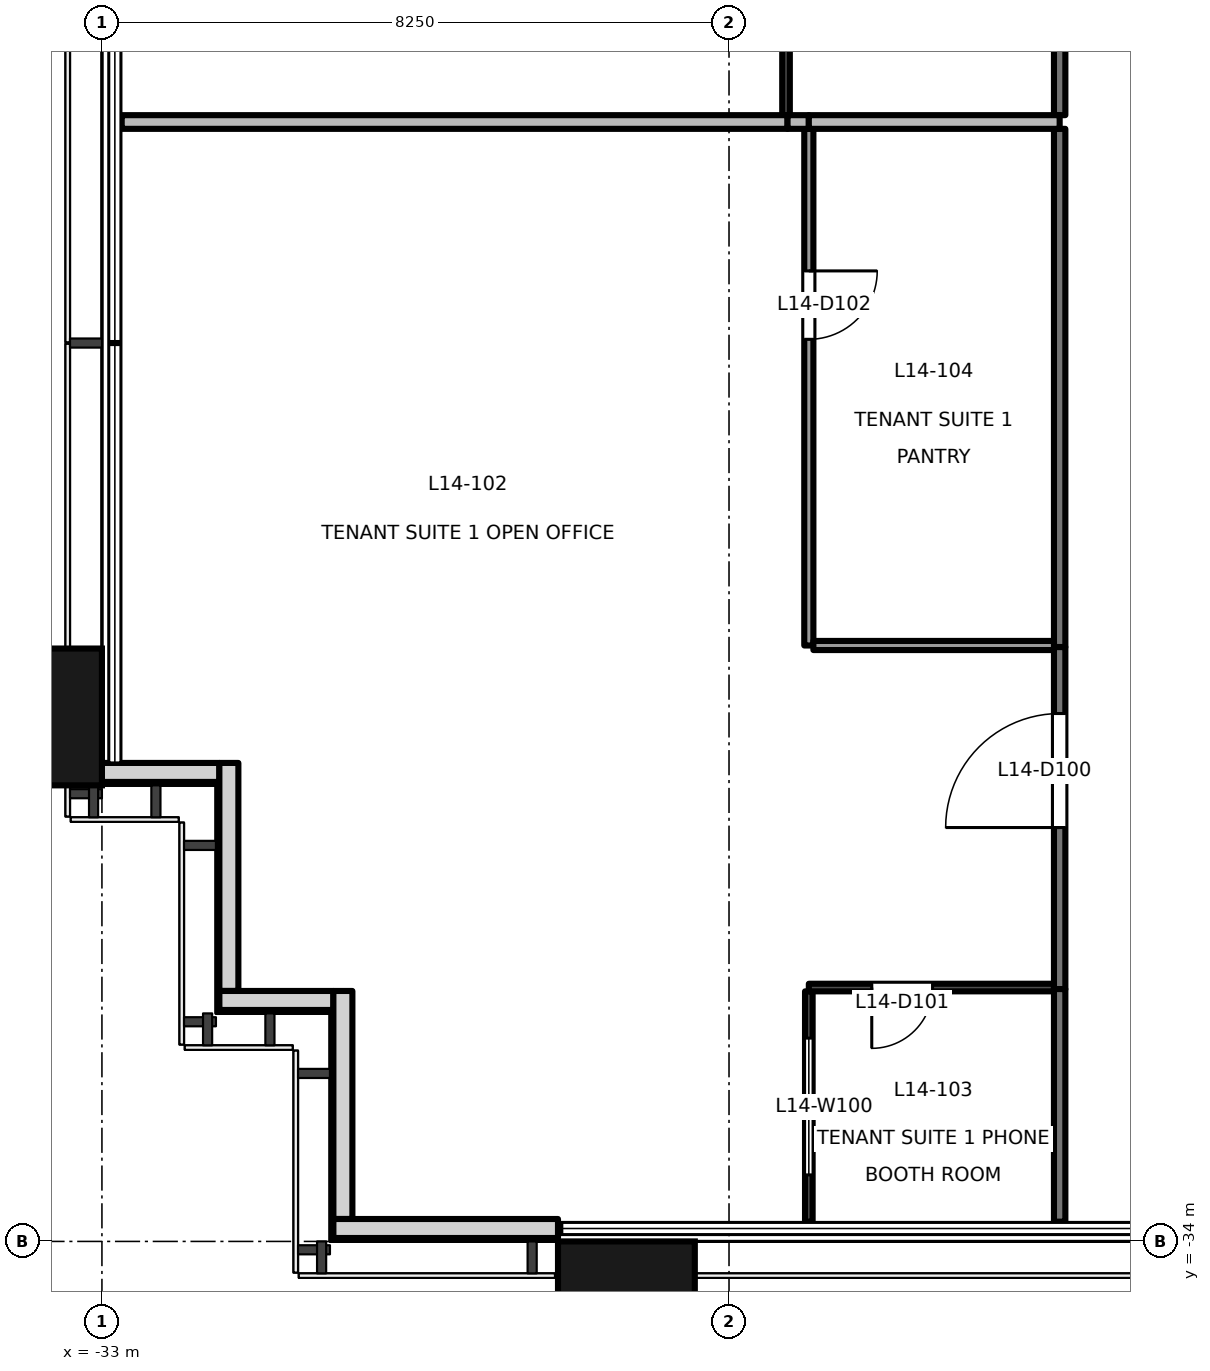
"""IFC4 building model, lengths in metres.
Left out: names, types, materials, properties, quantities, classifications, styles, units other than length and angle.
Written with IfcOpenShell. Run it as: python <this file> out.ifc"""

import sys

from ifc_helpers import new_model, si_unit, direction, frame, frame_2d, origin, origin_2d, place, context, subcontext, project, spatial, rectangle, extrude, element, fill, save


model = new_model("IFC4")
c1 = context("Model", 3, precision=1e-05, world=origin(), true_north=direction((0.0, 1.0)))
c2 = subcontext(c1, "Body", "Model", "MODEL_VIEW")
j1 = project(units=[si_unit("LENGTHUNIT", "METRE"), si_unit("PLANEANGLEUNIT", "RADIAN")], contexts=[c1])
p1 = place(None, origin())
s1 = spatial("IfcSite", under=j1, at=p1, CompositionType="ELEMENT")
p2 = place(p1, origin())
s2 = spatial("IfcBuilding", under=s1, at=p2, CompositionType="ELEMENT")
p3 = place(p2, frame((0.0, 0.0, 65.2)))
s3 = spatial("IfcBuildingStorey", under=s2, at=p3, CompositionType="ELEMENT", Elevation=65.2)
for number, where, z_axis, x_axis in (
    (1, (-26.1, -34.9, -0.2), (0.0, 0.0, 1.0), (1.0, 0.0, 0.0)),
    (2, (-33.9, -27.1, -0.2), (0.0, 0.0, 1.0), (0.0, 1.0, 0.0)),
):
    element("IfcColumn", number, at=place(p3, frame(where, z_axis=z_axis, x_axis=x_axis)), inside=s3, PredefinedType="COLUMN", context=c2, shape_type="SweptSolid", body=[
        extrude(rectangle(XDim=1.8, YDim=1.8, at=origin_2d()), origin(), (0.0, 0.0, 1.0), 4.1),
    ])
p4 = place(p3, frame((-33.005, -27.83, 0.0), z_axis=(0.0, 0.0, 1.0), x_axis=(1.0, 0.0, 0.0)))
e3 = element("IfcWall", 3, at=p4, inside=s3, PredefinedType="SOLIDWALL", context=c2, shape_type="SweptSolid", body=[
    extrude(rectangle(XDim=1.55, YDim=0.25, at=frame_2d((0.775, 0.0))), origin(), (0.0, 0.0, 1.0), 3.9),
])
p5 = place(p3, frame((-31.33, -27.705, 0.0), z_axis=(0.0, 0.0, 1.0), x_axis=(0.0, -1.0, 0.0)))
e4 = element("IfcWall", 4, at=p5, inside=s3, PredefinedType="SOLIDWALL", context=c2, shape_type="SweptSolid", body=[
    extrude(rectangle(XDim=3.0, YDim=0.25, at=frame_2d((1.5, 0.0))), origin(), (0.0, 0.0, 1.0), 3.9),
])
p6 = place(p3, frame((-31.455, -30.83, 0.0), z_axis=(0.0, 0.0, 1.0), x_axis=(1.0, 0.0, 0.0)))
e5 = element("IfcWall", 5, at=p6, inside=s3, PredefinedType="SOLIDWALL", context=c2, shape_type="SweptSolid", body=[
    extrude(rectangle(XDim=1.5, YDim=0.25, at=frame_2d((0.75, 0.0))), origin(), (0.0, 0.0, 1.0), 3.9),
])
p7 = place(p3, frame((-29.83, -30.705, 0.0), z_axis=(0.0, 0.0, 1.0), x_axis=(0.0, -1.0, 0.0)))
e6 = element("IfcWall", 6, at=p7, inside=s3, PredefinedType="SOLIDWALL", context=c2, shape_type="SweptSolid", body=[
    extrude(rectangle(XDim=3.0, YDim=0.25, at=frame_2d((1.5, 0.0))), origin(), (0.0, 0.0, 1.0), 3.9),
])
p8 = place(p3, frame((-29.955, -33.83, 0.0), z_axis=(0.0, 0.0, 1.0), x_axis=(1.0, 0.0, 0.0)))
e7 = element("IfcWall", 7, at=p8, inside=s3, PredefinedType="SOLIDWALL", context=c2, shape_type="SweptSolid", body=[
    extrude(rectangle(XDim=2.955, YDim=0.25, at=frame_2d((1.478, 0.0))), origin(), (0.0, 0.0, 1.0), 3.9),
])
p9 = place(p3, frame((-20.4, -30.68, 0.0), z_axis=(0.0, 0.0, 1.0), x_axis=(0.0, 1.0, 0.0)))
e8 = element("IfcWall", 8, at=p9, inside=s3, PredefinedType="PARTITIONING", context=c2, shape_type="SweptSolid", body=[
    extrude(rectangle(XDim=4.5, YDim=0.15, at=frame_2d((2.25, 0.0))), origin(), (0.0, 0.0, 1.0), 3.3),
])
p10 = place(p9, frame((2.125, 0.0, 0.0)))
e9 = element("IfcOpeningElement", 9, at=p10, cuts=e8, PredefinedType="OPENING", context=c2, shape_type="SweptSolid", body=[
    extrude(rectangle(XDim=1.5, YDim=2.1, at=frame_2d((0.75, 1.05))), frame((0.0, 0.085, 0.0), z_axis=(0.0, -1.0, 0.0), x_axis=(1.0, 0.0, 0.0)), (0.0, 0.0, 1.0), 0.171),
])
p11 = place(p3, frame((-20.4, -33.74, 0.0), z_axis=(0.0, 0.0, 1.0), x_axis=(0.0, 1.0, 0.0)))
e10 = element("IfcWall", 10, at=p11, inside=s3, PredefinedType="PARTITIONING", context=c2, shape_type="SweptSolid", body=[
    extrude(rectangle(XDim=3.06, YDim=0.15, at=frame_2d((1.53, 0.0))), origin(), (0.0, 0.0, 1.0), 3.9),
])
p12 = place(p3, frame((-20.4, -26.18, 0.0), z_axis=(0.0, 0.0, 1.0), x_axis=(0.0, 1.0, 0.0)))
e11 = element("IfcWall", 11, at=p12, inside=s3, PredefinedType="PARTITIONING", context=c2, shape_type="SweptSolid", body=[
    extrude(rectangle(XDim=6.817, YDim=0.15, at=frame_2d((3.408, 0.0))), origin(), (0.0, 0.0, 1.0), 3.3),
])
p13 = place(p3, frame((-20.4, -19.183, 0.0), z_axis=(0.0, 0.0, 1.0), x_axis=(0.0, 1.0, 0.0)))
e12 = element("IfcWall", 12, at=p13, inside=s3, PredefinedType="PARTITIONING", context=c2, shape_type="SweptSolid", body=[
    extrude(rectangle(XDim=5.93, YDim=0.15, at=frame_2d((2.965, 0.0))), origin(), (0.0, 0.0, 1.0), 3.3),
])
p14 = place(p3, frame((-23.7, -30.71, 0.0), z_axis=(0.0, 0.0, 1.0), x_axis=(0.0, -1.0, 0.0)))
e13 = element("IfcWall", 13, at=p14, inside=s3, PredefinedType="PARTITIONING", context=c2, shape_type="SweptSolid", body=[
    extrude(rectangle(XDim=3.03, YDim=0.1, at=frame_2d((1.515, 0.0))), origin(), (0.0, 0.0, 1.0), 3.9),
])
p15 = place(p14, frame((0.615, 0.0, 0.9)))
e14 = element("IfcOpeningElement", 14, at=p15, cuts=e13, PredefinedType="OPENING", context=c2, shape_type="SweptSolid", body=[
    extrude(rectangle(XDim=1.8, YDim=1.2, at=frame_2d((0.9, 0.6))), frame((0.0, 0.061, 0.0), z_axis=(0.0, -1.0, 0.0), x_axis=(1.0, 0.0, 0.0)), (0.0, 0.0, 1.0), 0.121),
])
p16 = place(p3, frame((-20.475, -30.66, 0.0), z_axis=(0.0, 0.0, 1.0), x_axis=(-1.0, 0.0, 0.0)))
e15 = element("IfcWall", 15, at=p16, inside=s3, PredefinedType="PARTITIONING", context=c2, shape_type="SweptSolid", body=[
    extrude(rectangle(XDim=3.225, YDim=0.1, at=frame_2d((1.612, 0.0))), origin(), (0.0, 0.0, 1.0), 3.9),
])
p17 = place(p16, frame((1.597, 0.0, 0.0)))
e16 = element("IfcOpeningElement", 16, at=p17, cuts=e15, PredefinedType="OPENING", context=c2, shape_type="SweptSolid", body=[
    extrude(rectangle(XDim=0.8, YDim=2.1, at=frame_2d((0.4, 1.05))), frame((0.0, 0.061, 0.0), z_axis=(0.0, -1.0, 0.0), x_axis=(1.0, 0.0, 0.0)), (0.0, 0.0, 1.0), 0.121),
])
p18 = place(p3, frame((-23.7, -19.363, 0.0), z_axis=(0.0, 0.0, 1.0), x_axis=(0.0, -1.0, 0.0)))
e17 = element("IfcWall", 17, at=p18, inside=s3, PredefinedType="PARTITIONING", context=c2, shape_type="SweptSolid", body=[
    extrude(rectangle(XDim=6.797, YDim=0.12, at=frame_2d((3.398, 0.0))), origin(), (0.0, 0.0, 1.0), 3.3),
])
p19 = place(p18, frame((1.869, 0.0, 0.0)))
e18 = element("IfcOpeningElement", 18, at=p19, cuts=e17, PredefinedType="OPENING", context=c2, shape_type="SweptSolid", body=[
    extrude(rectangle(XDim=0.9, YDim=2.1, at=frame_2d((0.45, 1.05))), frame((0.0, 0.071, 0.0), z_axis=(0.0, -1.0, 0.0), x_axis=(1.0, 0.0, 0.0)), (0.0, 0.0, 1.0), 0.141),
])
p20 = place(p3, frame((-23.64, -26.16, 0.0), z_axis=(0.0, 0.0, 1.0), x_axis=(1.0, 0.0, 0.0)))
e19 = element("IfcWall", 19, at=p20, inside=s3, PredefinedType="PARTITIONING", context=c2, shape_type="SweptSolid", body=[
    extrude(rectangle(XDim=3.165, YDim=0.12, at=frame_2d((1.583, 0.0))), origin(), (0.0, 0.0, 1.0), 3.9),
])
p21 = place(p3, frame((-32.74, -19.273, 0.0), z_axis=(0.0, 0.0, 1.0), x_axis=(1.0, 0.0, 0.0)))
e20 = element("IfcWall", 20, at=p21, inside=s3, PredefinedType="PARTITIONING", context=c2, shape_type="SweptSolid", body=[
    extrude(rectangle(XDim=8.76, YDim=0.18, at=frame_2d((4.38, 0.0))), origin(), (0.0, 0.0, 1.0), 3.9),
])
p22 = place(p3, frame((-23.98, -19.273, 0.0), z_axis=(0.0, 0.0, 1.0), x_axis=(1.0, 0.0, 0.0)))
e21 = element("IfcWall", 21, at=p22, inside=s3, PredefinedType="PARTITIONING", context=c2, shape_type="SweptSolid", body=[
    extrude(rectangle(XDim=0.28, YDim=0.18, at=frame_2d((0.14, 0.0))), origin(), (0.0, 0.0, 1.0), 3.9),
])
p23 = place(p3, frame((-23.7, -19.273, 0.0), z_axis=(0.0, 0.0, 1.0), x_axis=(1.0, 0.0, 0.0)))
e22 = element("IfcWall", 22, at=p23, inside=s3, PredefinedType="PARTITIONING", context=c2, shape_type="SweptSolid", body=[
    extrude(rectangle(XDim=3.3, YDim=0.18, at=frame_2d((1.65, 0.0))), origin(), (0.0, 0.0, 1.0), 3.9),
])
p24 = place(p3, frame((-24.0, -13.273, 0.0), z_axis=(0.0, 0.0, 1.0), x_axis=(0.0, -1.0, 0.0)))
e23 = element("IfcWall", 23, at=p24, inside=s3, PredefinedType="PARTITIONING", context=c2, shape_type="SweptSolid", body=[
    extrude(rectangle(XDim=5.91, YDim=0.1, at=frame_2d((2.955, 0.0))), origin(), (0.0, 0.0, 1.0), 3.3),
])
p25 = place(p24, frame((1.633, 0.0, 0.0)))
e24 = element("IfcOpeningElement", 24, at=p25, cuts=e23, PredefinedType="OPENING", context=c2, shape_type="SweptSolid", body=[
    extrude(rectangle(XDim=0.8, YDim=2.1, at=frame_2d((0.4, 1.05))), frame((0.0, 0.061, 0.0), z_axis=(0.0, -1.0, 0.0), x_axis=(1.0, 0.0, 0.0)), (0.0, 0.0, 1.0), 0.121),
])
p26 = place(p10, origin())
e25 = element("IfcDoor", 25, at=p26, inside=s3, OperationType="DOUBLE_DOOR_SINGLE_SWING", PredefinedType="DOOR", context=c2, shape_type="SweptSolid", body=[
    extrude(rectangle(XDim=1.5, YDim=2.1, at=frame_2d((0.75, 1.05))), frame((0.0, 0.025, 0.0), z_axis=(0.0, -1.0, 0.0), x_axis=(1.0, 0.0, 0.0)), (0.0, 0.0, 1.0), 0.05),
])
fill(e9, e25)
p27 = place(p17, origin())
e26 = element("IfcDoor", 26, at=p27, inside=s3, OperationType="SINGLE_SWING_RIGHT", PredefinedType="DOOR", context=c2, shape_type="SweptSolid", body=[
    extrude(rectangle(XDim=0.8, YDim=2.1, at=frame_2d((0.4, 1.05))), frame((0.0, 0.025, 0.0), z_axis=(0.0, -1.0, 0.0), x_axis=(1.0, 0.0, 0.0)), (0.0, 0.0, 1.0), 0.05),
])
fill(e16, e26)
p28 = place(p19, origin())
e27 = element("IfcDoor", 27, at=p28, inside=s3, OperationType="SINGLE_SWING_LEFT", PredefinedType="DOOR", context=c2, shape_type="SweptSolid", body=[
    extrude(rectangle(XDim=0.9, YDim=2.1, at=frame_2d((0.45, 1.05))), frame((0.0, 0.025, 0.0), z_axis=(0.0, -1.0, 0.0), x_axis=(1.0, 0.0, 0.0)), (0.0, 0.0, 1.0), 0.05),
])
fill(e18, e27)
p29 = place(p15, origin())
e28 = element("IfcWindow", 28, at=p29, inside=s3, PartitioningType="SINGLE_PANEL", PredefinedType="WINDOW", context=c2, shape_type="SweptSolid", body=[
    extrude(rectangle(XDim=1.8, YDim=1.2, at=frame_2d((0.9, 0.6))), frame((0.0, 0.03, 0.0), z_axis=(0.0, -1.0, 0.0), x_axis=(1.0, 0.0, 0.0)), (0.0, 0.0, 1.0), 0.06),
])
fill(e14, e28)
save(model, sys.argv[1])
